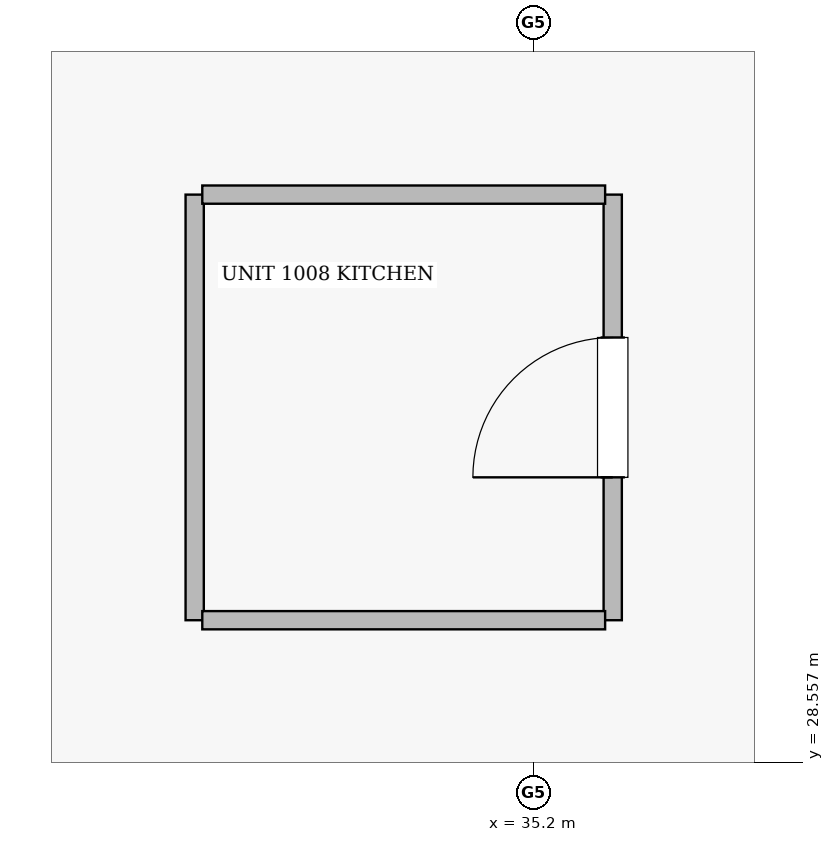
"""IFC4 building model, lengths in metres.
Left out: names, types, materials, properties, quantities, classifications, styles, units other than length and angle.
Written with IfcOpenShell. Run it as: python <this file> out.ifc"""

import sys

from ifc_helpers import new_model, si_unit, direction, frame, frame_2d, origin, place, context, subcontext, project, spatial, rectangle, extrude, element, fill, save


model = new_model("IFC4")
c1 = context("Model", 3, precision=1e-05, world=origin(), true_north=direction((0.0, 1.0)))
c2 = subcontext(c1, "Body", "Model", "MODEL_VIEW")
j1 = project(units=[si_unit("LENGTHUNIT", "METRE"), si_unit("PLANEANGLEUNIT", "RADIAN")], contexts=[c1])
p1 = place(None, origin())
s1 = spatial("IfcSite", under=j1, at=p1, CompositionType="ELEMENT")
p2 = place(p1, origin())
s2 = spatial("IfcBuilding", under=s1, at=p2, CompositionType="ELEMENT")
p3 = place(p2, frame((0.0, 0.0, 39.4)))
s3 = spatial("IfcBuildingStorey", under=s2, at=p3, CompositionType="ELEMENT", Elevation=39.4)
p4 = place(p3, frame((35.722, 29.49, 0.0), z_axis=(0.0, 0.0, 1.0), x_axis=(0.0, 1.0, 0.0)))
e1 = element("IfcWall", 1, at=p4, inside=s3, PredefinedType="PARTITIONING", context=c2, shape_type="SweptSolid", body=[
    extrude(rectangle(XDim=2.8, YDim=0.1, at=frame_2d((1.4, 0.0))), origin(), (0.0, 0.0, 1.0), 2.813),
])
p5 = place(p4, frame((0.94, 0.0, 0.0)))
e2 = element("IfcOpeningElement", 2, at=p5, cuts=e1, PredefinedType="OPENING", context=c2, shape_type="SweptSolid", body=[
    extrude(rectangle(XDim=0.92, YDim=2.1, at=frame_2d((0.46, 1.05))), frame((0.0, 0.06, 0.0), z_axis=(0.0, -1.0, 0.0), x_axis=(1.0, 0.0, 0.0)), (0.0, 0.0, 1.0), 0.12),
])
p6 = place(p3, frame((32.972, 32.29, 0.0), z_axis=(0.0, 0.0, 1.0), x_axis=(0.0, -1.0, 0.0)))
e3 = element("IfcWall", 3, at=p6, inside=s3, PredefinedType="PARTITIONING", context=c2, shape_type="SweptSolid", body=[
    extrude(rectangle(XDim=2.8, YDim=0.1, at=frame_2d((1.4, 0.0))), origin(), (0.0, 0.0, 1.0), 2.513),
])
p7 = place(p3, frame((35.672, 32.29, 0.0), z_axis=(0.0, 0.0, 1.0), x_axis=(-1.0, 0.0, 0.0)))
e4 = element("IfcWall", 4, at=p7, inside=s3, PredefinedType="PARTITIONING", context=c2, shape_type="SweptSolid", body=[
    extrude(rectangle(XDim=2.65, YDim=0.1, at=frame_2d((1.325, 0.0))), origin(), (0.0, 0.0, 1.0), 2.813),
])
p8 = place(p3, frame((33.022, 29.49, 0.0), z_axis=(0.0, 0.0, 1.0), x_axis=(1.0, 0.0, 0.0)))
e5 = element("IfcWall", 5, at=p8, inside=s3, PredefinedType="PARTITIONING", context=c2, shape_type="SweptSolid", body=[
    extrude(rectangle(XDim=2.65, YDim=0.1, at=frame_2d((1.325, 0.0))), origin(), (0.0, 0.0, 1.0), 2.513),
])
p9 = place(p5, origin())
e6 = element("IfcDoor", 6, at=p9, inside=s3, OperationType="SINGLE_SWING_LEFT", PredefinedType="DOOR", context=c2, shape_type="SweptSolid", body=[
    extrude(rectangle(XDim=0.92, YDim=2.1, at=frame_2d((0.46, 1.05))), frame((0.0, 0.025, 0.0), z_axis=(0.0, -1.0, 0.0), x_axis=(1.0, 0.0, 0.0)), (0.0, 0.0, 1.0), 0.05),
])
fill(e2, e6)
save(model, sys.argv[1])
